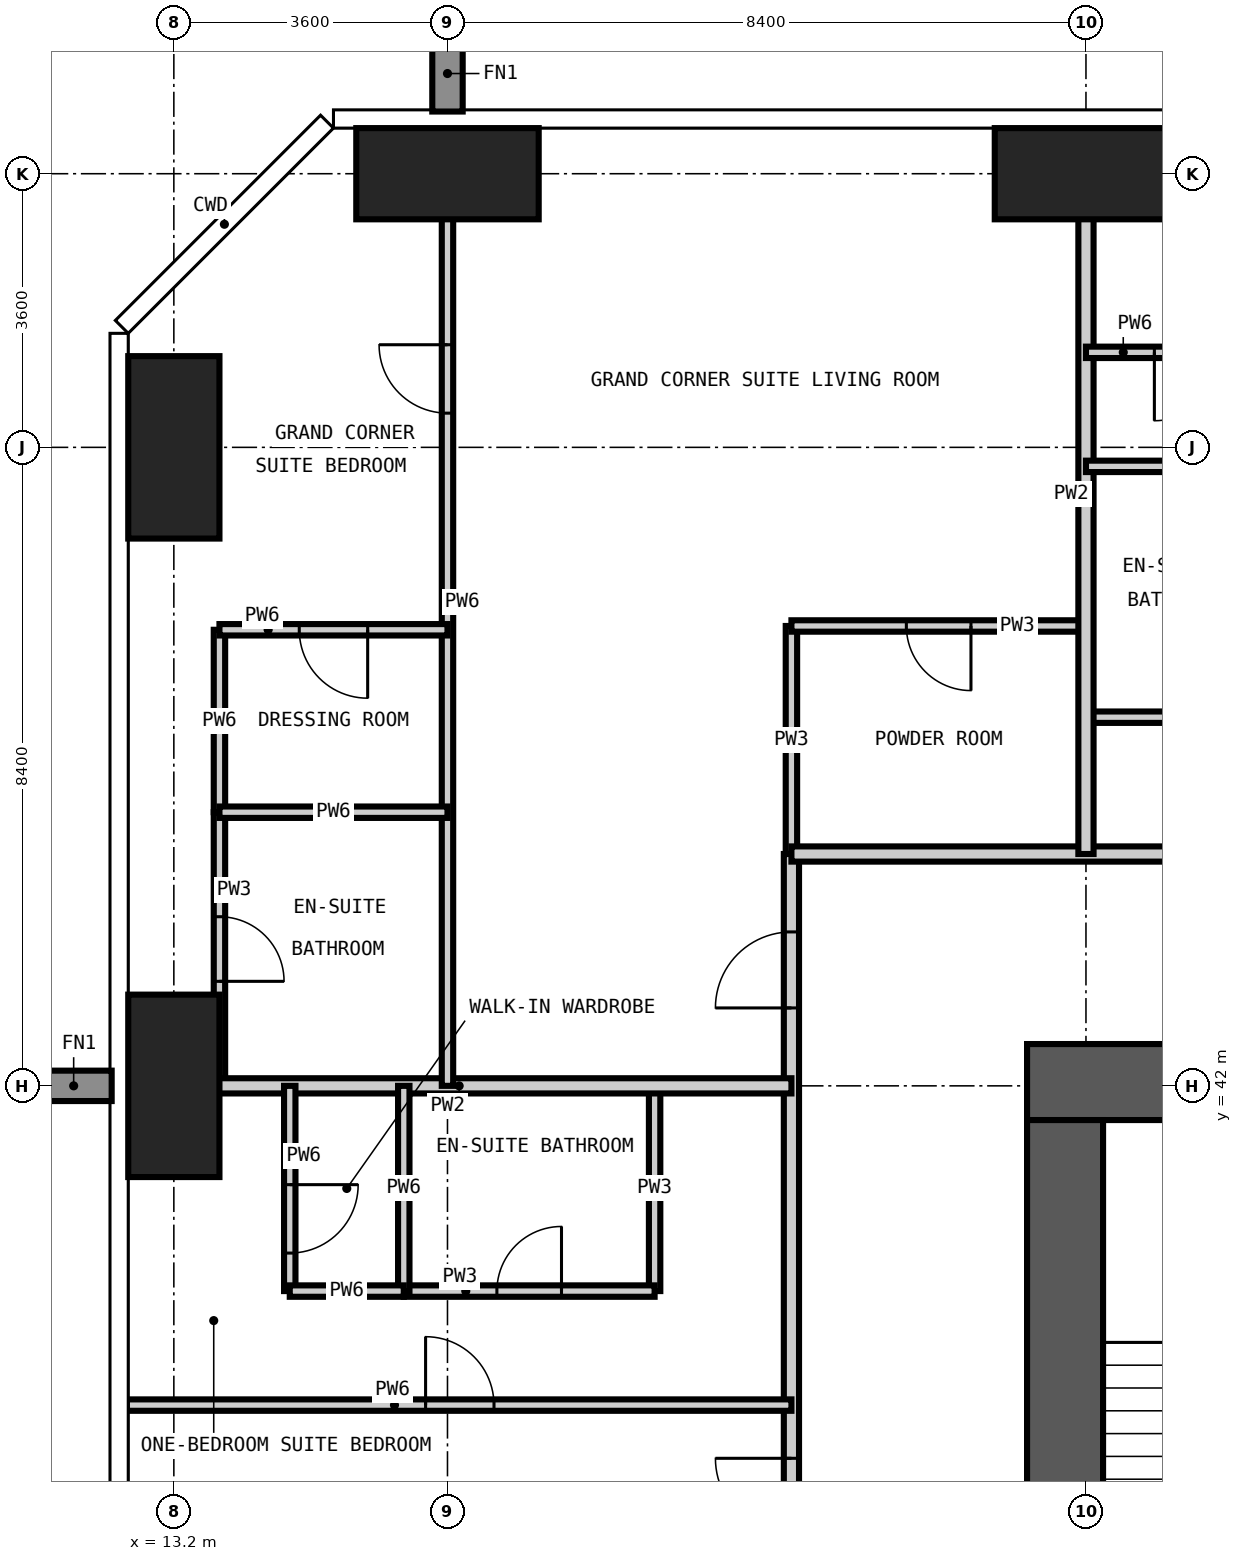
"""IFC4 building model, lengths in metres.
Left out: names, types, materials, properties, quantities, classifications, styles, units other than length and angle.
Written with IfcOpenShell. Run it as: python <this file> out.ifc"""

import sys

from ifc_helpers import new_model, si_unit, direction, frame, frame_2d, origin, origin_2d, place, context, subcontext, project, spatial, rectangle, extrude, element, fill, save


model = new_model("IFC4")
c1 = context("Model", 3, precision=1e-05, world=origin(), true_north=direction((0.0, 1.0)))
c2 = subcontext(c1, "Body", "Model", "MODEL_VIEW")
j1 = project(units=[si_unit("LENGTHUNIT", "METRE"), si_unit("PLANEANGLEUNIT", "RADIAN")], contexts=[c1])
p1 = place(None, origin())
s1 = spatial("IfcSite", under=j1, at=p1, CompositionType="ELEMENT")
p2 = place(p1, origin())
s2 = spatial("IfcBuilding", under=s1, at=p2, CompositionType="ELEMENT")
p3 = place(p2, frame((0.0, 0.0, 229.5)))
s3 = spatial("IfcBuildingStorey", under=s2, at=p3, CompositionType="ELEMENT", Elevation=229.5)
for number, where, z_axis, x_axis in (
    (1, (13.2, 42.0, -0.35), (0.0, 0.0, 1.0), (1.0, 0.0, 0.0)),
    (2, (13.2, 50.4, -0.35), (0.0, 0.0, 1.0), (1.0, 0.0, 0.0)),
):
    element("IfcColumn", number, at=place(p3, frame(where, z_axis=z_axis, x_axis=x_axis)), inside=s3, PredefinedType="COLUMN", context=c2, shape_type="SweptSolid", body=[
        extrude(rectangle(XDim=1.2, YDim=2.4, at=origin_2d()), origin(), (0.0, 0.0, 1.0), 3.9),
    ])
for number, where, z_axis, x_axis in (
    (3, (16.8, 54.0, -0.35), (0.0, 0.0, 1.0), (1.0, 0.0, 0.0)),
    (4, (25.2, 54.0, -0.35), (0.0, 0.0, 1.0), (1.0, 0.0, 0.0)),
):
    element("IfcColumn", number, at=place(p3, frame(where, z_axis=z_axis, x_axis=x_axis)), inside=s3, PredefinedType="COLUMN", context=c2, shape_type="SweptSolid", body=[
        extrude(rectangle(XDim=2.4, YDim=1.2, at=origin_2d()), origin(), (0.0, 0.0, 1.0), 3.9),
    ])
p4 = place(p3, frame((42.55, 42.05, -0.35), z_axis=(0.0, 0.0, 1.0), x_axis=(-1.0, 0.0, 0.0)))
e5 = element("IfcWall", 5, at=p4, inside=s3, PredefinedType="SHEAR", context=c2, shape_type="SweptSolid", body=[
    extrude(rectangle(XDim=18.125, YDim=1.0, at=frame_2d((9.062, 0.0))), origin(), (0.0, 0.0, 1.0), 3.9),
])
p5 = place(p4, frame((10.45, 0.0, 0.35)))
e6 = element("IfcOpeningElement", 6, at=p5, cuts=e5, PredefinedType="OPENING", context=c2, shape_type="SweptSolid", body=[
    extrude(rectangle(XDim=1.2, YDim=2.2, at=frame_2d((0.6, 1.1))), frame((0.0, 0.51, 0.0), z_axis=(0.0, -1.0, 0.0), x_axis=(1.0, 0.0, 0.0)), (0.0, 0.0, 1.0), 1.02),
])
p6 = place(p3, frame((24.925, 41.55, -0.35), z_axis=(0.0, 0.0, 1.0), x_axis=(0.0, -1.0, 0.0)))
e7 = element("IfcWall", 7, at=p6, inside=s3, PredefinedType="SHEAR", context=c2, shape_type="SweptSolid", body=[
    extrude(rectangle(XDim=24.3, YDim=1.0, at=frame_2d((12.15, 0.0))), origin(), (0.0, 0.0, 1.0), 3.9),
])
p7 = place(p6, frame((11.65, 0.0, 0.35)))
e8 = element("IfcOpeningElement", 8, at=p7, cuts=e7, PredefinedType="OPENING", context=c2, shape_type="SweptSolid", body=[
    extrude(rectangle(XDim=1.0, YDim=2.1, at=frame_2d((0.5, 1.05))), frame((0.0, 0.51, 0.0), z_axis=(0.0, -1.0, 0.0), x_axis=(1.0, 0.0, 0.0)), (0.0, 0.0, 1.0), 1.02),
])
p8 = place(p3, frame((13.8, 42.0, 0.0), z_axis=(0.0, 0.0, 1.0), x_axis=(0.0, 1.0, 0.0)))
e9 = element("IfcWall", 9, at=p8, inside=s3, PredefinedType="PARTITIONING", context=c2, shape_type="SweptSolid", body=[
    extrude(rectangle(XDim=3.6, YDim=0.15, at=frame_2d((1.8, 0.0))), origin(), (0.0, 0.0, 1.0), 3.55),
])
p9 = place(p8, frame((1.375, 0.0, 0.0)))
e10 = element("IfcOpeningElement", 10, at=p9, cuts=e9, PredefinedType="OPENING", context=c2, shape_type="SweptSolid", body=[
    extrude(rectangle(XDim=0.85, YDim=2.1, at=frame_2d((0.425, 1.05))), frame((0.0, 0.085, 0.0), z_axis=(0.0, -1.0, 0.0), x_axis=(1.0, 0.0, 0.0)), (0.0, 0.0, 1.0), 0.17),
])
p10 = place(p3, frame((19.525, 39.3, 0.0), z_axis=(0.0, 0.0, 1.0), x_axis=(0.0, 1.0, 0.0)))
e11 = element("IfcWall", 11, at=p10, inside=s3, PredefinedType="PARTITIONING", context=c2, shape_type="SweptSolid", body=[
    extrude(rectangle(XDim=2.7, YDim=0.15, at=frame_2d((1.35, 0.0))), origin(), (0.0, 0.0, 1.0), 3.55),
])
p11 = place(p3, frame((21.325, 45.05, 0.0), z_axis=(0.0, 0.0, 1.0), x_axis=(0.0, 1.0, 0.0)))
e12 = element("IfcWall", 12, at=p11, inside=s3, PredefinedType="PARTITIONING", context=c2, shape_type="SweptSolid", body=[
    extrude(rectangle(XDim=3.0, YDim=0.15, at=frame_2d((1.5, 0.0))), origin(), (0.0, 0.0, 1.0), 3.55),
])
p12 = place(p3, frame((16.225, 39.3, 0.0), z_axis=(0.0, 0.0, 1.0), x_axis=(1.0, 0.0, 0.0)))
e13 = element("IfcWall", 13, at=p12, inside=s3, PredefinedType="PARTITIONING", context=c2, shape_type="SweptSolid", body=[
    extrude(rectangle(XDim=3.3, YDim=0.15, at=frame_2d((1.65, 0.0))), origin(), (0.0, 0.0, 1.0), 3.55),
])
p13 = place(p12, frame((1.225, 0.0, 0.0)))
e14 = element("IfcOpeningElement", 14, at=p13, cuts=e13, PredefinedType="OPENING", context=c2, shape_type="SweptSolid", body=[
    extrude(rectangle(XDim=0.85, YDim=2.1, at=frame_2d((0.425, 1.05))), frame((0.0, 0.085, 0.0), z_axis=(0.0, -1.0, 0.0), x_axis=(1.0, 0.0, 0.0)), (0.0, 0.0, 1.0), 0.17),
])
p14 = place(p3, frame((25.2, 46.85, 0.0), z_axis=(0.0, 0.0, 1.0), x_axis=(1.0, 0.0, 0.0)))
e15 = element("IfcWall", 15, at=p14, inside=s3, PredefinedType="PARTITIONING", context=c2, shape_type="SweptSolid", body=[
    extrude(rectangle(XDim=2.7, YDim=0.15, at=frame_2d((1.35, 0.0))), origin(), (0.0, 0.0, 1.0), 3.55),
])
p15 = place(p3, frame((21.325, 48.05, 0.0), z_axis=(0.0, 0.0, 1.0), x_axis=(1.0, 0.0, 0.0)))
e16 = element("IfcWall", 16, at=p15, inside=s3, PredefinedType="PARTITIONING", context=c2, shape_type="SweptSolid", body=[
    extrude(rectangle(XDim=3.875, YDim=0.15, at=frame_2d((1.938, 0.0))), origin(), (0.0, 0.0, 1.0), 3.55),
])
p16 = place(p15, frame((1.512, 0.0, 0.0)))
e17 = element("IfcOpeningElement", 17, at=p16, cuts=e16, PredefinedType="OPENING", context=c2, shape_type="SweptSolid", body=[
    extrude(rectangle(XDim=0.85, YDim=2.1, at=frame_2d((0.425, 1.05))), frame((0.0, 0.085, 0.0), z_axis=(0.0, -1.0, 0.0), x_axis=(1.0, 0.0, 0.0)), (0.0, 0.0, 1.0), 0.17),
])
p17 = place(p3, frame((21.325, 13.15, 0.0), z_axis=(0.0, 0.0, 1.0), x_axis=(0.0, 1.0, 0.0)))
e18 = element("IfcWall", 18, at=p17, inside=s3, PredefinedType="PARTITIONING", context=c2, shape_type="SweptSolid", body=[
    extrude(rectangle(XDim=31.9, YDim=0.2, at=frame_2d((15.95, 0.0))), origin(), (0.0, 0.0, 1.0), 3.55),
])
p18 = place(p17, frame((6.15, 0.0, 0.0)))
e19 = element("IfcOpeningElement", 19, at=p18, cuts=e18, PredefinedType="OPENING", context=c2, shape_type="SweptSolid", body=[
    extrude(rectangle(XDim=1.0, YDim=2.2, at=frame_2d((0.5, 1.1))), frame((0.0, 0.11, 0.0), z_axis=(0.0, -1.0, 0.0), x_axis=(1.0, 0.0, 0.0)), (0.0, 0.0, 1.0), 0.22),
])
p19 = place(p17, frame((16.95, 0.0, 0.0)))
e20 = element("IfcOpeningElement", 20, at=p19, cuts=e18, PredefinedType="OPENING", context=c2, shape_type="SweptSolid", body=[
    extrude(rectangle(XDim=1.0, YDim=2.2, at=frame_2d((0.5, 1.1))), frame((0.0, 0.11, 0.0), z_axis=(0.0, -1.0, 0.0), x_axis=(1.0, 0.0, 0.0)), (0.0, 0.0, 1.0), 0.22),
])
p20 = place(p17, frame((22.95, 0.0, 0.0)))
e21 = element("IfcOpeningElement", 21, at=p20, cuts=e18, PredefinedType="OPENING", context=c2, shape_type="SweptSolid", body=[
    extrude(rectangle(XDim=1.0, YDim=2.2, at=frame_2d((0.5, 1.1))), frame((0.0, 0.11, 0.0), z_axis=(0.0, -1.0, 0.0), x_axis=(1.0, 0.0, 0.0)), (0.0, 0.0, 1.0), 0.22),
])
p21 = place(p17, frame((1.325, 0.0, 0.0)))
e22 = element("IfcOpeningElement", 22, at=p21, cuts=e18, PredefinedType="OPENING", context=c2, shape_type="SweptSolid", body=[
    extrude(rectangle(XDim=1.0, YDim=2.2, at=frame_2d((0.5, 1.1))), frame((0.0, 0.11, 0.0), z_axis=(0.0, -1.0, 0.0), x_axis=(1.0, 0.0, 0.0)), (0.0, 0.0, 1.0), 0.22),
])
p22 = place(p17, frame((29.875, 0.0, 0.0)))
e23 = element("IfcOpeningElement", 23, at=p22, cuts=e18, PredefinedType="OPENING", context=c2, shape_type="SweptSolid", body=[
    extrude(rectangle(XDim=1.0, YDim=2.2, at=frame_2d((0.5, 1.1))), frame((0.0, 0.11, 0.0), z_axis=(0.0, -1.0, 0.0), x_axis=(1.0, 0.0, 0.0)), (0.0, 0.0, 1.0), 0.22),
])
p23 = place(p3, frame((21.325, 45.05, 0.0), z_axis=(0.0, 0.0, 1.0), x_axis=(1.0, 0.0, 0.0)))
e24 = element("IfcWall", 24, at=p23, inside=s3, PredefinedType="PARTITIONING", context=c2, shape_type="SweptSolid", body=[
    extrude(rectangle(XDim=23.125, YDim=0.2, at=frame_2d((11.562, 0.0))), origin(), (0.0, 0.0, 1.0), 3.55),
])
p24 = place(p23, frame((5.475, 0.0, 0.0)))
e25 = element("IfcOpeningElement", 25, at=p24, cuts=e24, PredefinedType="OPENING", context=c2, shape_type="SweptSolid", body=[
    extrude(rectangle(XDim=1.0, YDim=2.2, at=frame_2d((0.5, 1.1))), frame((0.0, 0.11, 0.0), z_axis=(0.0, -1.0, 0.0), x_axis=(1.0, 0.0, 0.0)), (0.0, 0.0, 1.0), 0.22),
])
p25 = place(p23, frame((11.775, 0.0, 0.0)))
e26 = element("IfcOpeningElement", 26, at=p25, cuts=e24, PredefinedType="OPENING", context=c2, shape_type="SweptSolid", body=[
    extrude(rectangle(XDim=1.0, YDim=2.2, at=frame_2d((0.5, 1.1))), frame((0.0, 0.11, 0.0), z_axis=(0.0, -1.0, 0.0), x_axis=(1.0, 0.0, 0.0)), (0.0, 0.0, 1.0), 0.22),
])
p26 = place(p23, frame((18.075, 0.0, 0.0)))
e27 = element("IfcOpeningElement", 27, at=p26, cuts=e24, PredefinedType="OPENING", context=c2, shape_type="SweptSolid", body=[
    extrude(rectangle(XDim=1.0, YDim=2.2, at=frame_2d((0.5, 1.1))), frame((0.0, 0.11, 0.0), z_axis=(0.0, -1.0, 0.0), x_axis=(1.0, 0.0, 0.0)), (0.0, 0.0, 1.0), 0.22),
])
p27 = place(p3, frame((25.2, 45.05, 0.0), z_axis=(0.0, 0.0, 1.0), x_axis=(0.0, 1.0, 0.0)))
e28 = element("IfcWall", 28, at=p27, inside=s3, PredefinedType="PARTITIONING", context=c2, shape_type="SweptSolid", body=[
    extrude(rectangle(XDim=9.568, YDim=0.2, at=frame_2d((4.784, 0.0))), origin(), (0.0, 0.0, 1.0), 3.55),
])
p28 = place(p3, frame((12.582, 42.0, 0.0), z_axis=(0.0, 0.0, 1.0), x_axis=(1.0, 0.0, 0.0)))
e29 = element("IfcWall", 29, at=p28, inside=s3, PredefinedType="PARTITIONING", context=c2, shape_type="SweptSolid", body=[
    extrude(rectangle(XDim=8.743, YDim=0.2, at=frame_2d((4.372, 0.0))), origin(), (0.0, 0.0, 1.0), 3.55),
])
p29 = place(p3, frame((13.8, 45.6, 0.0), z_axis=(0.0, 0.0, 1.0), x_axis=(0.0, 1.0, 0.0)))
e30 = element("IfcWall", 30, at=p29, inside=s3, PredefinedType="PARTITIONING", context=c2, shape_type="SweptSolid", body=[
    extrude(rectangle(XDim=2.4, YDim=0.15, at=frame_2d((1.2, 0.0))), origin(), (0.0, 0.0, 1.0), 3.55),
])
p30 = place(p3, frame((14.725, 39.3, 0.0), z_axis=(0.0, 0.0, 1.0), x_axis=(0.0, 1.0, 0.0)))
e31 = element("IfcWall", 31, at=p30, inside=s3, PredefinedType="PARTITIONING", context=c2, shape_type="SweptSolid", body=[
    extrude(rectangle(XDim=2.7, YDim=0.15, at=frame_2d((1.35, 0.0))), origin(), (0.0, 0.0, 1.0), 3.55),
])
p31 = place(p30, frame((0.5, 0.0, 0.0)))
e32 = element("IfcOpeningElement", 32, at=p31, cuts=e31, PredefinedType="OPENING", context=c2, shape_type="SweptSolid", body=[
    extrude(rectangle(XDim=0.9, YDim=2.1, at=frame_2d((0.45, 1.05))), frame((0.0, 0.085, 0.0), z_axis=(0.0, -1.0, 0.0), x_axis=(1.0, 0.0, 0.0)), (0.0, 0.0, 1.0), 0.17),
])
p32 = place(p3, frame((16.225, 39.3, 0.0), z_axis=(0.0, 0.0, 1.0), x_axis=(0.0, 1.0, 0.0)))
e33 = element("IfcWall", 33, at=p32, inside=s3, PredefinedType="PARTITIONING", context=c2, shape_type="SweptSolid", body=[
    extrude(rectangle(XDim=2.7, YDim=0.15, at=frame_2d((1.35, 0.0))), origin(), (0.0, 0.0, 1.0), 3.55),
])
p33 = place(p3, frame((16.8, 42.0, 0.0), z_axis=(0.0, 0.0, 1.0), x_axis=(0.0, 1.0, 0.0)))
e34 = element("IfcWall", 34, at=p33, inside=s3, PredefinedType="PARTITIONING", context=c2, shape_type="SweptSolid", body=[
    extrude(rectangle(XDim=12.618, YDim=0.15, at=frame_2d((6.309, 0.0))), origin(), (0.0, 0.0, 1.0), 3.55),
])
p34 = place(p33, frame((8.85, 0.0, 0.0)))
e35 = element("IfcOpeningElement", 35, at=p34, cuts=e34, PredefinedType="OPENING", context=c2, shape_type="SweptSolid", body=[
    extrude(rectangle(XDim=0.9, YDim=2.1, at=frame_2d((0.45, 1.05))), frame((0.0, 0.085, 0.0), z_axis=(0.0, -1.0, 0.0), x_axis=(1.0, 0.0, 0.0)), (0.0, 0.0, 1.0), 0.17),
])
p35 = place(p3, frame((12.582, 37.8, 0.0), z_axis=(0.0, 0.0, 1.0), x_axis=(1.0, 0.0, 0.0)))
e36 = element("IfcWall", 36, at=p35, inside=s3, PredefinedType="PARTITIONING", context=c2, shape_type="SweptSolid", body=[
    extrude(rectangle(XDim=8.743, YDim=0.15, at=frame_2d((4.372, 0.0))), origin(), (0.0, 0.0, 1.0), 3.55),
])
p36 = place(p35, frame((3.93, 0.0, 0.0)))
e37 = element("IfcOpeningElement", 37, at=p36, cuts=e36, PredefinedType="OPENING", context=c2, shape_type="SweptSolid", body=[
    extrude(rectangle(XDim=0.9, YDim=2.1, at=frame_2d((0.45, 1.05))), frame((0.0, 0.085, 0.0), z_axis=(0.0, -1.0, 0.0), x_axis=(1.0, 0.0, 0.0)), (0.0, 0.0, 1.0), 0.17),
])
p37 = place(p3, frame((14.725, 39.3, 0.0), z_axis=(0.0, 0.0, 1.0), x_axis=(1.0, 0.0, 0.0)))
e38 = element("IfcWall", 38, at=p37, inside=s3, PredefinedType="PARTITIONING", context=c2, shape_type="SweptSolid", body=[
    extrude(rectangle(XDim=1.5, YDim=0.15, at=frame_2d((0.75, 0.0))), origin(), (0.0, 0.0, 1.0), 3.55),
])
p38 = place(p3, frame((13.8, 45.6, 0.0), z_axis=(0.0, 0.0, 1.0), x_axis=(1.0, 0.0, 0.0)))
e39 = element("IfcWall", 39, at=p38, inside=s3, PredefinedType="PARTITIONING", context=c2, shape_type="SweptSolid", body=[
    extrude(rectangle(XDim=3.0, YDim=0.15, at=frame_2d((1.5, 0.0))), origin(), (0.0, 0.0, 1.0), 3.55),
])
p39 = place(p3, frame((13.8, 48.0, 0.0), z_axis=(0.0, 0.0, 1.0), x_axis=(1.0, 0.0, 0.0)))
e40 = element("IfcWall", 40, at=p39, inside=s3, PredefinedType="PARTITIONING", context=c2, shape_type="SweptSolid", body=[
    extrude(rectangle(XDim=3.0, YDim=0.15, at=frame_2d((1.5, 0.0))), origin(), (0.0, 0.0, 1.0), 3.55),
])
p40 = place(p39, frame((1.05, 0.0, 0.0)))
e41 = element("IfcOpeningElement", 41, at=p40, cuts=e40, PredefinedType="OPENING", context=c2, shape_type="SweptSolid", body=[
    extrude(rectangle(XDim=0.9, YDim=2.1, at=frame_2d((0.45, 1.05))), frame((0.0, 0.085, 0.0), z_axis=(0.0, -1.0, 0.0), x_axis=(1.0, 0.0, 0.0)), (0.0, 0.0, 1.0), 0.17),
])
p41 = place(p3, frame((25.2, 50.15, 0.0), z_axis=(0.0, 0.0, 1.0), x_axis=(1.0, 0.0, 0.0)))
e42 = element("IfcWall", 42, at=p41, inside=s3, PredefinedType="PARTITIONING", context=c2, shape_type="SweptSolid", body=[
    extrude(rectangle(XDim=2.7, YDim=0.15, at=frame_2d((1.35, 0.0))), origin(), (0.0, 0.0, 1.0), 3.55),
])
p42 = place(p3, frame((25.2, 51.65, 0.0), z_axis=(0.0, 0.0, 1.0), x_axis=(1.0, 0.0, 0.0)))
e43 = element("IfcWall", 43, at=p42, inside=s3, PredefinedType="PARTITIONING", context=c2, shape_type="SweptSolid", body=[
    extrude(rectangle(XDim=2.7, YDim=0.15, at=frame_2d((1.35, 0.0))), origin(), (0.0, 0.0, 1.0), 3.55),
])
p43 = place(p42, frame((0.9, 0.0, 0.0)))
e44 = element("IfcOpeningElement", 44, at=p43, cuts=e43, PredefinedType="OPENING", context=c2, shape_type="SweptSolid", body=[
    extrude(rectangle(XDim=0.9, YDim=2.1, at=frame_2d((0.45, 1.05))), frame((0.0, 0.085, 0.0), z_axis=(0.0, -1.0, 0.0), x_axis=(1.0, 0.0, 0.0)), (0.0, 0.0, 1.0), 0.17),
])
p44 = place(p43, frame((0.9, 0.0, 0.0), z_axis=(0.0, 0.0, 1.0), x_axis=(-1.0, 0.0, 0.0)))
e45 = element("IfcDoor", 45, at=p44, inside=s3, OperationType="SINGLE_SWING_RIGHT", PredefinedType="DOOR", context=c2, shape_type="SweptSolid", body=[
    extrude(rectangle(XDim=0.9, YDim=2.1, at=frame_2d((0.45, 1.05))), frame((0.0, 0.025, 0.0), z_axis=(0.0, -1.0, 0.0), x_axis=(1.0, 0.0, 0.0)), (0.0, 0.0, 1.0), 0.05),
])
fill(e44, e45)
p45 = place(p20, origin())
e46 = element("IfcDoor", 46, at=p45, inside=s3, OperationType="SINGLE_SWING_RIGHT", PredefinedType="DOOR", context=c2, shape_type="SweptSolid", body=[
    extrude(rectangle(XDim=1.0, YDim=2.2, at=frame_2d((0.5, 1.1))), frame((0.0, 0.025, 0.0), z_axis=(0.0, -1.0, 0.0), x_axis=(1.0, 0.0, 0.0)), (0.0, 0.0, 1.0), 0.05),
])
fill(e21, e46)
p46 = place(p36, origin())
e47 = element("IfcDoor", 47, at=p46, inside=s3, OperationType="SINGLE_SWING_LEFT", PredefinedType="DOOR", context=c2, shape_type="SweptSolid", body=[
    extrude(rectangle(XDim=0.9, YDim=2.1, at=frame_2d((0.45, 1.05))), frame((0.0, 0.025, 0.0), z_axis=(0.0, -1.0, 0.0), x_axis=(1.0, 0.0, 0.0)), (0.0, 0.0, 1.0), 0.05),
])
fill(e37, e47)
p47 = place(p13, origin())
e48 = element("IfcDoor", 48, at=p47, inside=s3, OperationType="SINGLE_SWING_RIGHT", PredefinedType="DOOR", context=c2, shape_type="SweptSolid", body=[
    extrude(rectangle(XDim=0.85, YDim=2.1, at=frame_2d((0.425, 1.05))), frame((0.0, 0.025, 0.0), z_axis=(0.0, -1.0, 0.0), x_axis=(1.0, 0.0, 0.0)), (0.0, 0.0, 1.0), 0.05),
])
fill(e14, e48)
p48 = place(p31, frame((0.9, 0.0, 0.0), z_axis=(0.0, 0.0, 1.0), x_axis=(-1.0, 0.0, 0.0)))
e49 = element("IfcDoor", 49, at=p48, inside=s3, OperationType="SINGLE_SWING_LEFT", PredefinedType="DOOR", context=c2, shape_type="SweptSolid", body=[
    extrude(rectangle(XDim=0.9, YDim=2.1, at=frame_2d((0.45, 1.05))), frame((0.0, 0.025, 0.0), z_axis=(0.0, -1.0, 0.0), x_axis=(1.0, 0.0, 0.0)), (0.0, 0.0, 1.0), 0.05),
])
fill(e32, e49)
p49 = place(p22, origin())
e50 = element("IfcDoor", 50, at=p49, inside=s3, OperationType="SINGLE_SWING_LEFT", PredefinedType="DOOR", context=c2, shape_type="SweptSolid", body=[
    extrude(rectangle(XDim=1.0, YDim=2.2, at=frame_2d((0.5, 1.1))), frame((0.0, 0.025, 0.0), z_axis=(0.0, -1.0, 0.0), x_axis=(1.0, 0.0, 0.0)), (0.0, 0.0, 1.0), 0.05),
])
fill(e23, e50)
p50 = place(p16, frame((0.85, 0.0, 0.0), z_axis=(0.0, 0.0, 1.0), x_axis=(-1.0, 0.0, 0.0)))
e51 = element("IfcDoor", 51, at=p50, inside=s3, OperationType="SINGLE_SWING_LEFT", PredefinedType="DOOR", context=c2, shape_type="SweptSolid", body=[
    extrude(rectangle(XDim=0.85, YDim=2.1, at=frame_2d((0.425, 1.05))), frame((0.0, 0.025, 0.0), z_axis=(0.0, -1.0, 0.0), x_axis=(1.0, 0.0, 0.0)), (0.0, 0.0, 1.0), 0.05),
])
fill(e17, e51)
p51 = place(p34, origin())
e52 = element("IfcDoor", 52, at=p51, inside=s3, OperationType="SINGLE_SWING_RIGHT", PredefinedType="DOOR", context=c2, shape_type="SweptSolid", body=[
    extrude(rectangle(XDim=0.9, YDim=2.1, at=frame_2d((0.45, 1.05))), frame((0.0, 0.025, 0.0), z_axis=(0.0, -1.0, 0.0), x_axis=(1.0, 0.0, 0.0)), (0.0, 0.0, 1.0), 0.05),
])
fill(e35, e52)
p52 = place(p9, frame((0.85, 0.0, 0.0), z_axis=(0.0, 0.0, 1.0), x_axis=(-1.0, 0.0, 0.0)))
e53 = element("IfcDoor", 53, at=p52, inside=s3, OperationType="SINGLE_SWING_RIGHT", PredefinedType="DOOR", context=c2, shape_type="SweptSolid", body=[
    extrude(rectangle(XDim=0.85, YDim=2.1, at=frame_2d((0.425, 1.05))), frame((0.0, 0.025, 0.0), z_axis=(0.0, -1.0, 0.0), x_axis=(1.0, 0.0, 0.0)), (0.0, 0.0, 1.0), 0.05),
])
fill(e10, e53)
p53 = place(p40, frame((0.9, 0.0, 0.0), z_axis=(0.0, 0.0, 1.0), x_axis=(-1.0, 0.0, 0.0)))
e54 = element("IfcDoor", 54, at=p53, inside=s3, OperationType="SINGLE_SWING_LEFT", PredefinedType="DOOR", context=c2, shape_type="SweptSolid", body=[
    extrude(rectangle(XDim=0.9, YDim=2.1, at=frame_2d((0.45, 1.05))), frame((0.0, 0.025, 0.0), z_axis=(0.0, -1.0, 0.0), x_axis=(1.0, 0.0, 0.0)), (0.0, 0.0, 1.0), 0.05),
])
fill(e41, e54)
save(model, sys.argv[1])
